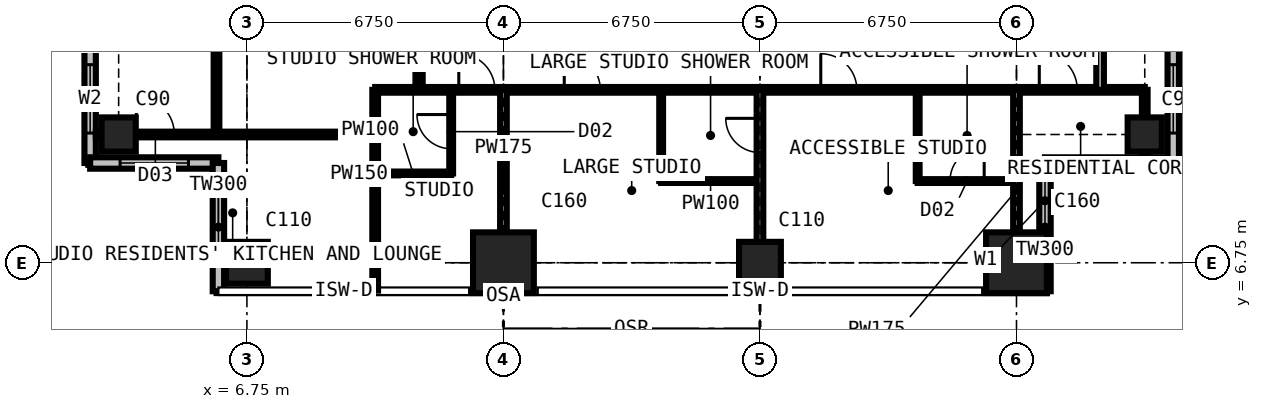
"""IFC4 building model, lengths in metres.
Left out: names, types, materials, properties, quantities, classifications, styles, units other than length and angle.
Written with IfcOpenShell. Run it as: python <this file> out.ifc"""

import sys

from ifc_helpers import new_model, si_unit, direction, frame, frame_2d, origin, origin_2d, place, context, subcontext, project, spatial, rectangle, extrude, element, fill, save


model = new_model("IFC4")
c1 = context("Model", 3, precision=1e-05, world=origin(), true_north=direction((0.0, 1.0)))
c2 = subcontext(c1, "Body", "Model", "MODEL_VIEW")
j1 = project(units=[si_unit("LENGTHUNIT", "METRE"), si_unit("PLANEANGLEUNIT", "RADIAN")], contexts=[c1])
p1 = place(None, origin())
s1 = spatial("IfcSite", under=j1, at=p1, CompositionType="ELEMENT")
p2 = place(p1, origin())
s2 = spatial("IfcBuilding", under=s1, at=p2, CompositionType="ELEMENT")
p3 = place(p2, frame((0.0, 0.0, 207.9)))
s3 = spatial("IfcBuildingStorey", under=s2, at=p3, CompositionType="ELEMENT", Elevation=207.9)
p4 = place(p3, frame((3.375, 10.125, 0.0), z_axis=(0.0, 0.0, 1.0), x_axis=(1.0, 0.0, 0.0)))
e1 = element("IfcColumn", 1, at=p4, inside=s3, PredefinedType="COLUMN", context=c2, shape_type="SweptSolid", body=[
    extrude(rectangle(XDim=0.9, YDim=0.9, at=origin_2d()), origin(), (0.0, 0.0, 1.0), 3.6),
])
p5 = place(p3, frame((6.75, 6.75, 0.0), z_axis=(0.0, 0.0, 1.0), x_axis=(1.0, 0.0, 0.0)))
e2 = element("IfcColumn", 2, at=p5, inside=s3, PredefinedType="COLUMN", context=c2, shape_type="SweptSolid", body=[
    extrude(rectangle(XDim=1.1, YDim=1.1, at=origin_2d()), origin(), (0.0, 0.0, 1.0), 3.6),
])
p6 = place(p3, frame((13.5, 6.75, 0.0), z_axis=(0.0, 0.0, 1.0), x_axis=(1.0, 0.0, 0.0)))
e3 = element("IfcColumn", 3, at=p6, inside=s3, PredefinedType="COLUMN", context=c2, shape_type="SweptSolid", body=[
    extrude(rectangle(XDim=1.6, YDim=1.6, at=origin_2d()), origin(), (0.0, 0.0, 1.0), 3.6),
])
p7 = place(p3, frame((20.25, 6.75, 0.0), z_axis=(0.0, 0.0, 1.0), x_axis=(1.0, 0.0, 0.0)))
e4 = element("IfcColumn", 4, at=p7, inside=s3, PredefinedType="COLUMN", context=c2, shape_type="SweptSolid", body=[
    extrude(rectangle(XDim=1.1, YDim=1.1, at=origin_2d()), origin(), (0.0, 0.0, 1.0), 3.6),
])
p8 = place(p3, frame((27.0, 6.75, 0.0), z_axis=(0.0, 0.0, 1.0), x_axis=(1.0, 0.0, 0.0)))
e5 = element("IfcColumn", 5, at=p8, inside=s3, PredefinedType="COLUMN", context=c2, shape_type="SweptSolid", body=[
    extrude(rectangle(XDim=1.6, YDim=1.6, at=origin_2d()), origin(), (0.0, 0.0, 1.0), 3.6),
])
p9 = place(p3, frame((30.375, 10.125, 0.0), z_axis=(0.0, 0.0, 1.0), x_axis=(1.0, 0.0, 0.0)))
e6 = element("IfcColumn", 6, at=p9, inside=s3, PredefinedType="COLUMN", context=c2, shape_type="SweptSolid", body=[
    extrude(rectangle(XDim=0.9, YDim=0.9, at=origin_2d()), origin(), (0.0, 0.0, 1.0), 3.6),
])
p10 = place(p3, frame((2.625, 12.75, 0.0), z_axis=(0.0, 0.0, 1.0), x_axis=(0.0, -1.0, 0.0)))
e7 = element("IfcWall", 7, at=p10, inside=s3, PredefinedType="SOLIDWALL", context=c2, shape_type="SweptSolid", body=[
    extrude(rectangle(XDim=3.375, YDim=0.3, at=frame_2d((1.688, 0.0))), origin(), (0.0, 0.0, 1.0), 3.375),
])
p11 = place(p10, frame((0.788, 0.0, 0.6)))
e8 = element("IfcOpeningElement", 8, at=p11, cuts=e7, PredefinedType="OPENING", context=c2, shape_type="SweptSolid", body=[
    extrude(rectangle(XDim=1.8, YDim=2.1, at=frame_2d((0.9, 1.05))), frame((0.0, 0.16, 0.0), z_axis=(0.0, -1.0, 0.0), x_axis=(1.0, 0.0, 0.0)), (0.0, 0.0, 1.0), 0.32),
])
p12 = place(p3, frame((2.625, 9.375, 0.0), z_axis=(0.0, 0.0, 1.0), x_axis=(1.0, 0.0, 0.0)))
e9 = element("IfcWall", 9, at=p12, inside=s3, PredefinedType="SOLIDWALL", context=c2, shape_type="SweptSolid", body=[
    extrude(rectangle(XDim=3.375, YDim=0.3, at=frame_2d((1.688, 0.0))), origin(), (0.0, 0.0, 1.0), 3.375),
])
p13 = place(p12, frame((0.788, 0.0, 0.6)))
e10 = element("IfcOpeningElement", 10, at=p13, cuts=e9, PredefinedType="OPENING", context=c2, shape_type="SweptSolid", body=[
    extrude(rectangle(XDim=1.8, YDim=2.1, at=frame_2d((0.9, 1.05))), frame((0.0, 0.16, 0.0), z_axis=(0.0, -1.0, 0.0), x_axis=(1.0, 0.0, 0.0)), (0.0, 0.0, 1.0), 0.32),
])
p14 = place(p3, frame((6.0, 9.375, 0.0), z_axis=(0.0, 0.0, 1.0), x_axis=(0.0, -1.0, 0.0)))
e11 = element("IfcWall", 11, at=p14, inside=s3, PredefinedType="SOLIDWALL", context=c2, shape_type="SweptSolid", body=[
    extrude(rectangle(XDim=3.375, YDim=0.3, at=frame_2d((1.688, 0.0))), origin(), (0.0, 0.0, 1.0), 3.375),
])
p15 = place(p14, frame((0.788, 0.0, 0.6)))
e12 = element("IfcOpeningElement", 12, at=p15, cuts=e11, PredefinedType="OPENING", context=c2, shape_type="SweptSolid", body=[
    extrude(rectangle(XDim=1.8, YDim=2.1, at=frame_2d((0.9, 1.05))), frame((0.0, 0.16, 0.0), z_axis=(0.0, -1.0, 0.0), x_axis=(1.0, 0.0, 0.0)), (0.0, 0.0, 1.0), 0.32),
])
p16 = place(p3, frame((27.75, 6.0, 0.0), z_axis=(0.0, 0.0, 1.0), x_axis=(0.0, 1.0, 0.0)))
e13 = element("IfcWall", 13, at=p16, inside=s3, PredefinedType="SOLIDWALL", context=c2, shape_type="SweptSolid", body=[
    extrude(rectangle(XDim=3.375, YDim=0.3, at=frame_2d((1.688, 0.0))), origin(), (0.0, 0.0, 1.0), 3.375),
])
p17 = place(p16, frame((1.633, 0.0, 0.9)))
e14 = element("IfcOpeningElement", 14, at=p17, cuts=e13, PredefinedType="OPENING", context=c2, shape_type="SweptSolid", body=[
    extrude(rectangle(XDim=1.5, YDim=1.8, at=frame_2d((0.75, 0.9))), frame((0.0, 0.16, 0.0), z_axis=(0.0, -1.0, 0.0), x_axis=(1.0, 0.0, 0.0)), (0.0, 0.0, 1.0), 0.32),
])
p18 = place(p3, frame((27.75, 9.375, 0.0), z_axis=(0.0, 0.0, 1.0), x_axis=(1.0, 0.0, 0.0)))
e15 = element("IfcWall", 15, at=p18, inside=s3, PredefinedType="SOLIDWALL", context=c2, shape_type="SweptSolid", body=[
    extrude(rectangle(XDim=3.375, YDim=0.3, at=frame_2d((1.688, 0.0))), origin(), (0.0, 0.0, 1.0), 3.375),
])
p19 = place(p18, frame((0.788, 0.0, 0.6)))
e16 = element("IfcOpeningElement", 16, at=p19, cuts=e15, PredefinedType="OPENING", context=c2, shape_type="SweptSolid", body=[
    extrude(rectangle(XDim=1.8, YDim=2.1, at=frame_2d((0.9, 1.05))), frame((0.0, 0.16, 0.0), z_axis=(0.0, -1.0, 0.0), x_axis=(1.0, 0.0, 0.0)), (0.0, 0.0, 1.0), 0.32),
])
p20 = place(p3, frame((31.125, 9.375, 0.0), z_axis=(0.0, 0.0, 1.0), x_axis=(0.0, 1.0, 0.0)))
e17 = element("IfcWall", 17, at=p20, inside=s3, PredefinedType="SOLIDWALL", context=c2, shape_type="SweptSolid", body=[
    extrude(rectangle(XDim=3.375, YDim=0.3, at=frame_2d((1.688, 0.0))), origin(), (0.0, 0.0, 1.0), 3.375),
])
p21 = place(p20, frame((0.788, 0.0, 0.6)))
e18 = element("IfcOpeningElement", 18, at=p21, cuts=e17, PredefinedType="OPENING", context=c2, shape_type="SweptSolid", body=[
    extrude(rectangle(XDim=1.8, YDim=2.1, at=frame_2d((0.9, 1.05))), frame((0.0, 0.16, 0.0), z_axis=(0.0, -1.0, 0.0), x_axis=(1.0, 0.0, 0.0)), (0.0, 0.0, 1.0), 0.32),
])
p22 = place(p3, frame((2.775, 10.125, 0.0), z_axis=(0.0, 0.0, 1.0), x_axis=(1.0, 0.0, 0.0)))
e19 = element("IfcWall", 19, at=p22, inside=s3, PredefinedType="PARTITIONING", context=c2, shape_type="SweptSolid", body=[
    extrude(rectangle(XDim=7.35, YDim=0.15, at=frame_2d((3.675, 0.0))), origin(), (0.0, 0.0, 1.0), 2.877),
])
p23 = place(p22, frame((1.066, 0.0, 0.0)))
e20 = element("IfcOpeningElement", 20, at=p23, cuts=e19, PredefinedType="OPENING", context=c2, shape_type="SweptSolid", body=[
    extrude(rectangle(XDim=1.0, YDim=2.2, at=frame_2d((0.5, 1.1))), frame((0.0, 0.085, 0.0), z_axis=(0.0, -1.0, 0.0), x_axis=(1.0, 0.0, 0.0)), (0.0, 0.0, 1.0), 0.17),
])
p24 = place(p3, frame((5.95, 10.125, 0.0), z_axis=(0.0, 0.0, 1.0), x_axis=(0.0, 1.0, 0.0)))
e21 = element("IfcWall", 21, at=p24, inside=s3, PredefinedType="PARTITIONING", context=c2, shape_type="SweptSolid", body=[
    extrude(rectangle(XDim=2.65, YDim=0.15, at=frame_2d((1.325, 0.0))), origin(), (0.0, 0.0, 1.0), 3.375),
])
p25 = place(p3, frame((10.125, 6.016, 0.0), z_axis=(0.0, 0.0, 1.0), x_axis=(0.0, 1.0, 0.0)))
e22 = element("IfcWall", 22, at=p25, inside=s3, PredefinedType="PARTITIONING", context=c2, shape_type="SweptSolid", body=[
    extrude(rectangle(XDim=5.284, YDim=0.15, at=frame_2d((2.642, 0.0))), origin(), (0.0, 0.0, 1.0), 3.375),
])
p26 = place(p3, frame((10.125, 9.1, 0.0), z_axis=(0.0, 0.0, 1.0), x_axis=(1.0, 0.0, 0.0)))
e23 = element("IfcWall", 23, at=p26, inside=s3, PredefinedType="PARTITIONING", context=c2, shape_type="SweptSolid", body=[
    extrude(rectangle(XDim=2.0, YDim=0.1, at=frame_2d((1.0, 0.0))), origin(), (0.0, 0.0, 1.0), 3.375),
])
p27 = place(p3, frame((10.125, 11.3, 0.0), z_axis=(0.0, 0.0, 1.0), x_axis=(1.0, 0.0, 0.0)))
e24 = element("IfcWall", 24, at=p27, inside=s3, PredefinedType="PARTITIONING", context=c2, shape_type="SweptSolid", body=[
    extrude(rectangle(XDim=20.25, YDim=0.15, at=frame_2d((10.125, 0.0))), origin(), (0.0, 0.0, 1.0), 3.375),
])
p28 = place(p27, frame((11.725, 0.0, 0.0)))
e25 = element("IfcOpeningElement", 25, at=p28, cuts=e24, PredefinedType="OPENING", context=c2, shape_type="SweptSolid", body=[
    extrude(rectangle(XDim=0.95, YDim=2.2, at=frame_2d((0.475, 1.1))), frame((0.0, 0.085, 0.0), z_axis=(0.0, -1.0, 0.0), x_axis=(1.0, 0.0, 0.0)), (0.0, 0.0, 1.0), 0.17),
])
p29 = place(p27, frame((4.975, 0.0, 0.0)))
e26 = element("IfcOpeningElement", 26, at=p29, cuts=e24, PredefinedType="OPENING", context=c2, shape_type="SweptSolid", body=[
    extrude(rectangle(XDim=0.95, YDim=2.2, at=frame_2d((0.475, 1.1))), frame((0.0, 0.085, 0.0), z_axis=(0.0, -1.0, 0.0), x_axis=(1.0, 0.0, 0.0)), (0.0, 0.0, 1.0), 0.17),
])
p30 = place(p27, frame((2.2, 0.0, 0.0)))
e27 = element("IfcOpeningElement", 27, at=p30, cuts=e24, PredefinedType="OPENING", context=c2, shape_type="SweptSolid", body=[
    extrude(rectangle(XDim=0.95, YDim=2.2, at=frame_2d((0.475, 1.1))), frame((0.0, 0.085, 0.0), z_axis=(0.0, -1.0, 0.0), x_axis=(1.0, 0.0, 0.0)), (0.0, 0.0, 1.0), 0.17),
])
p31 = place(p27, frame((17.475, 0.0, 0.0)))
e28 = element("IfcOpeningElement", 28, at=p31, cuts=e24, PredefinedType="OPENING", context=c2, shape_type="SweptSolid", body=[
    extrude(rectangle(XDim=1.0, YDim=2.2, at=frame_2d((0.5, 1.1))), frame((0.0, 0.085, 0.0), z_axis=(0.0, -1.0, 0.0), x_axis=(1.0, 0.0, 0.0)), (0.0, 0.0, 1.0), 0.17),
])
p32 = place(p3, frame((11.3, 11.3, 0.0), z_axis=(0.0, 0.0, 1.0), x_axis=(0.0, 1.0, 0.0)))
e29 = element("IfcWall", 29, at=p32, inside=s3, PredefinedType="PARTITIONING", context=c2, shape_type="SweptSolid", body=[
    extrude(rectangle(XDim=19.3, YDim=0.15, at=frame_2d((9.65, 0.0))), origin(), (0.0, 0.0, 1.0), 3.375),
])
p33 = place(p32, frame((13.525, 0.0, 0.0)))
e30 = element("IfcOpeningElement", 30, at=p33, cuts=e29, PredefinedType="OPENING", context=c2, shape_type="SweptSolid", body=[
    extrude(rectangle(XDim=1.0, YDim=2.2, at=frame_2d((0.5, 1.1))), frame((0.0, 0.085, 0.0), z_axis=(0.0, -1.0, 0.0), x_axis=(1.0, 0.0, 0.0)), (0.0, 0.0, 1.0), 0.17),
])
p34 = place(p32, frame((10.438, 0.0, 0.0)))
e31 = element("IfcOpeningElement", 31, at=p34, cuts=e29, PredefinedType="OPENING", context=c2, shape_type="SweptSolid", body=[
    extrude(rectangle(XDim=1.0, YDim=2.2, at=frame_2d((0.5, 1.1))), frame((0.0, 0.085, 0.0), z_axis=(0.0, -1.0, 0.0), x_axis=(1.0, 0.0, 0.0)), (0.0, 0.0, 1.0), 0.17),
])
p35 = place(p3, frame((12.125, 9.1, 0.0), z_axis=(0.0, 0.0, 1.0), x_axis=(0.0, 1.0, 0.0)))
e32 = element("IfcWall", 32, at=p35, inside=s3, PredefinedType="PARTITIONING", context=c2, shape_type="SweptSolid", body=[
    extrude(rectangle(XDim=2.2, YDim=0.1, at=frame_2d((1.1, 0.0))), origin(), (0.0, 0.0, 1.0), 3.375),
])
p36 = place(p35, frame((0.65, 0.0, 0.0)))
e33 = element("IfcOpeningElement", 33, at=p36, cuts=e32, PredefinedType="OPENING", context=c2, shape_type="SweptSolid", body=[
    extrude(rectangle(XDim=0.9, YDim=2.2, at=frame_2d((0.45, 1.1))), frame((0.0, 0.06, 0.0), z_axis=(0.0, -1.0, 0.0), x_axis=(1.0, 0.0, 0.0)), (0.0, 0.0, 1.0), 0.12),
])
p37 = place(p3, frame((13.5, 6.016, 0.0), z_axis=(0.0, 0.0, 1.0), x_axis=(0.0, 1.0, 0.0)))
e34 = element("IfcWall", 34, at=p37, inside=s3, PredefinedType="PARTITIONING", context=c2, shape_type="SweptSolid", body=[
    extrude(rectangle(XDim=5.284, YDim=0.175, at=frame_2d((2.642, 0.0))), origin(), (0.0, 0.0, 1.0), 2.61),
])
p38 = place(p3, frame((17.65, 8.9, 0.0), z_axis=(0.0, 0.0, 1.0), x_axis=(0.0, 1.0, 0.0)))
e35 = element("IfcWall", 35, at=p38, inside=s3, PredefinedType="PARTITIONING", context=c2, shape_type="SweptSolid", body=[
    extrude(rectangle(XDim=2.4, YDim=0.1, at=frame_2d((1.2, 0.0))), origin(), (0.0, 0.0, 1.0), 3.375),
])
p39 = place(p3, frame((17.65, 8.9, 0.0), z_axis=(0.0, 0.0, 1.0), x_axis=(1.0, 0.0, 0.0)))
e36 = element("IfcWall", 36, at=p39, inside=s3, PredefinedType="PARTITIONING", context=c2, shape_type="SweptSolid", body=[
    extrude(rectangle(XDim=2.6, YDim=0.1, at=frame_2d((1.3, 0.0))), origin(), (0.0, 0.0, 1.0), 3.375),
])
p40 = place(p3, frame((20.25, 6.016, 0.0), z_axis=(0.0, 0.0, 1.0), x_axis=(0.0, 1.0, 0.0)))
e37 = element("IfcWall", 37, at=p40, inside=s3, PredefinedType="PARTITIONING", context=c2, shape_type="SweptSolid", body=[
    extrude(rectangle(XDim=5.284, YDim=0.175, at=frame_2d((2.642, 0.0))), origin(), (0.0, 0.0, 1.0), 2.61),
])
p41 = place(p40, frame((3.634, 0.0, 0.0)))
e38 = element("IfcOpeningElement", 38, at=p41, cuts=e37, PredefinedType="OPENING", context=c2, shape_type="SweptSolid", body=[
    extrude(rectangle(XDim=0.9, YDim=2.2, at=frame_2d((0.45, 1.1))), frame((0.0, 0.097, 0.0), z_axis=(0.0, -1.0, 0.0), x_axis=(1.0, 0.0, 0.0)), (0.0, 0.0, 1.0), 0.195),
])
p42 = place(p3, frame((24.4, 8.9, 0.0), z_axis=(0.0, 0.0, 1.0), x_axis=(0.0, 1.0, 0.0)))
e39 = element("IfcWall", 39, at=p42, inside=s3, PredefinedType="PARTITIONING", context=c2, shape_type="SweptSolid", body=[
    extrude(rectangle(XDim=2.4, YDim=0.1, at=frame_2d((1.2, 0.0))), origin(), (0.0, 0.0, 1.0), 3.375),
])
p43 = place(p3, frame((24.4, 8.9, 0.0), z_axis=(0.0, 0.0, 1.0), x_axis=(1.0, 0.0, 0.0)))
e40 = element("IfcWall", 40, at=p43, inside=s3, PredefinedType="PARTITIONING", context=c2, shape_type="SweptSolid", body=[
    extrude(rectangle(XDim=2.6, YDim=0.1, at=frame_2d((1.3, 0.0))), origin(), (0.0, 0.0, 1.0), 3.375),
])
p44 = place(p43, frame((0.85, 0.0, 0.0)))
e41 = element("IfcOpeningElement", 41, at=p44, cuts=e40, PredefinedType="OPENING", context=c2, shape_type="SweptSolid", body=[
    extrude(rectangle(XDim=0.9, YDim=2.2, at=frame_2d((0.45, 1.1))), frame((0.0, 0.06, 0.0), z_axis=(0.0, -1.0, 0.0), x_axis=(1.0, 0.0, 0.0)), (0.0, 0.0, 1.0), 0.12),
])
p45 = place(p3, frame((27.0, 6.016, 0.0), z_axis=(0.0, 0.0, 1.0), x_axis=(0.0, 1.0, 0.0)))
e42 = element("IfcWall", 42, at=p45, inside=s3, PredefinedType="PARTITIONING", context=c2, shape_type="SweptSolid", body=[
    extrude(rectangle(XDim=5.284, YDim=0.175, at=frame_2d((2.642, 0.0))), origin(), (0.0, 0.0, 1.0), 2.877),
])
p46 = place(p3, frame((27.0, 9.375, 0.0), z_axis=(0.0, 0.0, 1.0), x_axis=(1.0, 0.0, 0.0)))
e43 = element("IfcWall", 43, at=p46, inside=s3, PredefinedType="PARTITIONING", context=c2, shape_type="SweptSolid", body=[
    extrude(rectangle(XDim=0.734, YDim=0.15, at=frame_2d((0.367, 0.0))), origin(), (0.0, 0.0, 1.0), 3.375),
])
p47 = place(p3, frame((29.2, 11.3, 0.0), z_axis=(0.0, 0.0, 1.0), x_axis=(0.0, 1.0, 0.0)))
e44 = element("IfcWall", 44, at=p47, inside=s3, PredefinedType="PARTITIONING", context=c2, shape_type="SweptSolid", body=[
    extrude(rectangle(XDim=17.9, YDim=0.2, at=frame_2d((8.95, 0.0))), origin(), (0.0, 0.0, 1.0), 3.375),
])
p48 = place(p47, frame((2.3, 0.0, 0.0)))
e45 = element("IfcOpeningElement", 45, at=p48, cuts=e44, PredefinedType="OPENING", context=c2, shape_type="SweptSolid", body=[
    extrude(rectangle(XDim=1.0, YDim=2.2, at=frame_2d((0.5, 1.1))), frame((0.0, 0.11, 0.0), z_axis=(0.0, -1.0, 0.0), x_axis=(1.0, 0.0, 0.0)), (0.0, 0.0, 1.0), 0.22),
])
p49 = place(p47, frame((10.55, 0.0, 0.0)))
e46 = element("IfcOpeningElement", 46, at=p49, cuts=e44, PredefinedType="OPENING", context=c2, shape_type="SweptSolid", body=[
    extrude(rectangle(XDim=0.95, YDim=2.2, at=frame_2d((0.475, 1.1))), frame((0.0, 0.11, 0.0), z_axis=(0.0, -1.0, 0.0), x_axis=(1.0, 0.0, 0.0)), (0.0, 0.0, 1.0), 0.22),
])
p50 = place(p47, frame((5.775, 0.0, 0.0)))
e47 = element("IfcOpeningElement", 47, at=p50, cuts=e44, PredefinedType="OPENING", context=c2, shape_type="SweptSolid", body=[
    extrude(rectangle(XDim=0.95, YDim=2.2, at=frame_2d((0.475, 1.1))), frame((0.0, 0.11, 0.0), z_axis=(0.0, -1.0, 0.0), x_axis=(1.0, 0.0, 0.0)), (0.0, 0.0, 1.0), 0.22),
])
p51 = place(p47, frame((16.3, 0.0, 0.0)))
e48 = element("IfcOpeningElement", 48, at=p51, cuts=e44, PredefinedType="OPENING", context=c2, shape_type="SweptSolid", body=[
    extrude(rectangle(XDim=1.0, YDim=2.2, at=frame_2d((0.5, 1.1))), frame((0.0, 0.11, 0.0), z_axis=(0.0, -1.0, 0.0), x_axis=(1.0, 0.0, 0.0)), (0.0, 0.0, 1.0), 0.22),
])
p52 = place(p3, frame((30.375, 9.525, 0.0), z_axis=(0.0, 0.0, 1.0), x_axis=(0.0, 1.0, 0.0)))
e49 = element("IfcWall", 49, at=p52, inside=s3, PredefinedType="PARTITIONING", context=c2, shape_type="SweptSolid", body=[
    extrude(rectangle(XDim=1.775, YDim=0.15, at=frame_2d((0.888, 0.0))), origin(), (0.0, 0.0, 1.0), 2.877),
])
p53 = place(p11, origin())
e50 = element("IfcWindow", 50, at=p53, inside=s3, PartitioningType="SINGLE_PANEL", PredefinedType="WINDOW", context=c2, shape_type="SweptSolid", body=[
    extrude(rectangle(XDim=1.8, YDim=2.1, at=frame_2d((0.9, 1.05))), frame((0.0, 0.03, 0.0), z_axis=(0.0, -1.0, 0.0), x_axis=(1.0, 0.0, 0.0)), (0.0, 0.0, 1.0), 0.06),
])
fill(e8, e50)
p54 = place(p13, origin())
e51 = element("IfcWindow", 51, at=p54, inside=s3, PartitioningType="SINGLE_PANEL", PredefinedType="WINDOW", context=c2, shape_type="SweptSolid", body=[
    extrude(rectangle(XDim=1.8, YDim=2.1, at=frame_2d((0.9, 1.05))), frame((0.0, 0.03, 0.0), z_axis=(0.0, -1.0, 0.0), x_axis=(1.0, 0.0, 0.0)), (0.0, 0.0, 1.0), 0.06),
])
fill(e10, e51)
p55 = place(p15, origin())
e52 = element("IfcWindow", 52, at=p55, inside=s3, PartitioningType="SINGLE_PANEL", PredefinedType="WINDOW", context=c2, shape_type="SweptSolid", body=[
    extrude(rectangle(XDim=1.8, YDim=2.1, at=frame_2d((0.9, 1.05))), frame((0.0, 0.03, 0.0), z_axis=(0.0, -1.0, 0.0), x_axis=(1.0, 0.0, 0.0)), (0.0, 0.0, 1.0), 0.06),
])
fill(e12, e52)
p56 = place(p17, origin())
e53 = element("IfcWindow", 53, at=p56, inside=s3, PartitioningType="SINGLE_PANEL", PredefinedType="WINDOW", context=c2, shape_type="SweptSolid", body=[
    extrude(rectangle(XDim=1.5, YDim=1.8, at=frame_2d((0.75, 0.9))), frame((0.0, 0.03, 0.0), z_axis=(0.0, -1.0, 0.0), x_axis=(1.0, 0.0, 0.0)), (0.0, 0.0, 1.0), 0.06),
])
fill(e14, e53)
p57 = place(p19, origin())
e54 = element("IfcWindow", 54, at=p57, inside=s3, PartitioningType="SINGLE_PANEL", PredefinedType="WINDOW", context=c2, shape_type="SweptSolid", body=[
    extrude(rectangle(XDim=1.8, YDim=2.1, at=frame_2d((0.9, 1.05))), frame((0.0, 0.03, 0.0), z_axis=(0.0, -1.0, 0.0), x_axis=(1.0, 0.0, 0.0)), (0.0, 0.0, 1.0), 0.06),
])
fill(e16, e54)
p58 = place(p21, origin())
e55 = element("IfcWindow", 55, at=p58, inside=s3, PartitioningType="SINGLE_PANEL", PredefinedType="WINDOW", context=c2, shape_type="SweptSolid", body=[
    extrude(rectangle(XDim=1.8, YDim=2.1, at=frame_2d((0.9, 1.05))), frame((0.0, 0.03, 0.0), z_axis=(0.0, -1.0, 0.0), x_axis=(1.0, 0.0, 0.0)), (0.0, 0.0, 1.0), 0.06),
])
fill(e18, e55)
p59 = place(p23, origin())
e56 = element("IfcDoor", 56, at=p59, inside=s3, OperationType="SINGLE_SWING_LEFT", PredefinedType="DOOR", context=c2, shape_type="SweptSolid", body=[
    extrude(rectangle(XDim=1.0, YDim=2.2, at=frame_2d((0.5, 1.1))), frame((0.0, 0.025, 0.0), z_axis=(0.0, -1.0, 0.0), x_axis=(1.0, 0.0, 0.0)), (0.0, 0.0, 1.0), 0.05),
])
fill(e20, e56)
p60 = place(p28, origin())
e57 = element("IfcDoor", 57, at=p60, inside=s3, OperationType="SINGLE_SWING_LEFT", PredefinedType="DOOR", context=c2, shape_type="SweptSolid", body=[
    extrude(rectangle(XDim=0.95, YDim=2.2, at=frame_2d((0.475, 1.1))), frame((0.0, 0.025, 0.0), z_axis=(0.0, -1.0, 0.0), x_axis=(1.0, 0.0, 0.0)), (0.0, 0.0, 1.0), 0.05),
])
fill(e25, e57)
p61 = place(p44, origin())
e58 = element("IfcDoor", 58, at=p61, inside=s3, OperationType="SINGLE_SWING_RIGHT", PredefinedType="DOOR", context=c2, shape_type="SweptSolid", body=[
    extrude(rectangle(XDim=0.9, YDim=2.2, at=frame_2d((0.45, 1.1))), frame((0.0, 0.025, 0.0), z_axis=(0.0, -1.0, 0.0), x_axis=(1.0, 0.0, 0.0)), (0.0, 0.0, 1.0), 0.05),
])
fill(e41, e58)
p62 = place(p29, origin())
e59 = element("IfcDoor", 59, at=p62, inside=s3, OperationType="SINGLE_SWING_LEFT", PredefinedType="DOOR", context=c2, shape_type="SweptSolid", body=[
    extrude(rectangle(XDim=0.95, YDim=2.2, at=frame_2d((0.475, 1.1))), frame((0.0, 0.025, 0.0), z_axis=(0.0, -1.0, 0.0), x_axis=(1.0, 0.0, 0.0)), (0.0, 0.0, 1.0), 0.05),
])
fill(e26, e59)
p63 = place(p41, origin())
e60 = element("IfcDoor", 60, at=p63, inside=s3, OperationType="SINGLE_SWING_RIGHT", PredefinedType="DOOR", context=c2, shape_type="SweptSolid", body=[
    extrude(rectangle(XDim=0.9, YDim=2.2, at=frame_2d((0.45, 1.1))), frame((0.0, 0.025, 0.0), z_axis=(0.0, -1.0, 0.0), x_axis=(1.0, 0.0, 0.0)), (0.0, 0.0, 1.0), 0.05),
])
fill(e38, e60)
p64 = place(p30, origin())
e61 = element("IfcDoor", 61, at=p64, inside=s3, OperationType="SINGLE_SWING_LEFT", PredefinedType="DOOR", context=c2, shape_type="SweptSolid", body=[
    extrude(rectangle(XDim=0.95, YDim=2.2, at=frame_2d((0.475, 1.1))), frame((0.0, 0.025, 0.0), z_axis=(0.0, -1.0, 0.0), x_axis=(1.0, 0.0, 0.0)), (0.0, 0.0, 1.0), 0.05),
])
fill(e27, e61)
p65 = place(p36, origin())
e62 = element("IfcDoor", 62, at=p65, inside=s3, OperationType="SINGLE_SWING_RIGHT", PredefinedType="DOOR", context=c2, shape_type="SweptSolid", body=[
    extrude(rectangle(XDim=0.9, YDim=2.2, at=frame_2d((0.45, 1.1))), frame((0.0, 0.025, 0.0), z_axis=(0.0, -1.0, 0.0), x_axis=(1.0, 0.0, 0.0)), (0.0, 0.0, 1.0), 0.05),
])
fill(e33, e62)
p66 = place(p31, origin())
e63 = element("IfcDoor", 63, at=p66, inside=s3, OperationType="SINGLE_SWING_LEFT", PredefinedType="DOOR", context=c2, shape_type="SweptSolid", body=[
    extrude(rectangle(XDim=1.0, YDim=2.2, at=frame_2d((0.5, 1.1))), frame((0.0, 0.025, 0.0), z_axis=(0.0, -1.0, 0.0), x_axis=(1.0, 0.0, 0.0)), (0.0, 0.0, 1.0), 0.05),
])
fill(e28, e63)
save(model, sys.argv[1])
